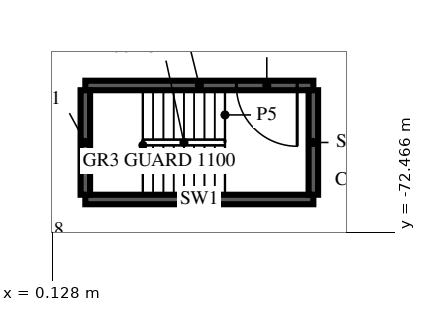
"""IFC4 building model, lengths in metres.
Left out: names, types, materials, properties, quantities, classifications, styles, units other than length and angle.
Written with IfcOpenShell. Run it as: python <this file> out.ifc"""

import sys

from ifc_helpers import new_model, si_unit, direction, frame, frame_2d, origin, place, context, subcontext, project, spatial, rectangle, extrude, element, fill, save


model = new_model("IFC4")
c1 = context("Model", 3, precision=1e-05, world=origin(), true_north=direction((0.0, 1.0)))
c2 = subcontext(c1, "Body", "Model", "MODEL_VIEW")
j1 = project(units=[si_unit("LENGTHUNIT", "METRE"), si_unit("PLANEANGLEUNIT", "RADIAN")], contexts=[c1])
p1 = place(None, origin())
s1 = spatial("IfcSite", under=j1, at=p1, CompositionType="ELEMENT")
p2 = place(p1, origin())
s2 = spatial("IfcBuilding", under=s1, at=p2, CompositionType="ELEMENT")
p3 = place(p2, origin())
s3 = spatial("IfcBuildingStorey", under=s2, at=p3, CompositionType="ELEMENT", Elevation=0.0)
p4 = place(p3, frame((1.0, -71.6, 0.0), z_axis=(0.0, 0.0, 1.0), x_axis=(1.0, 0.0, 0.0)))
e1 = element("IfcWall", 1, at=p4, inside=s3, PredefinedType="SOLIDWALL", context=c2, shape_type="SweptSolid", body=[
    extrude(rectangle(XDim=6.0, YDim=0.25, at=frame_2d((3.0, 0.0))), origin(), (0.0, 0.0, 1.0), 6.0),
])
p5 = place(p3, frame((7.0, -68.6, 0.0), z_axis=(0.0, 0.0, 1.0), x_axis=(-1.0, 0.0, 0.0)))
e2 = element("IfcWall", 2, at=p5, inside=s3, PredefinedType="SOLIDWALL", context=c2, shape_type="SweptSolid", body=[
    extrude(rectangle(XDim=6.0, YDim=0.25, at=frame_2d((3.0, 0.0))), origin(), (0.0, 0.0, 1.0), 6.0),
])
p6 = place(p5, frame((0.425, 0.0, 0.0)))
e3 = element("IfcOpeningElement", 3, at=p6, cuts=e2, PredefinedType="OPENING", context=c2, shape_type="SweptSolid", body=[
    extrude(rectangle(XDim=1.6, YDim=2.1, at=frame_2d((0.8, 1.05))), frame((0.0, 0.14, 0.0), z_axis=(0.0, -1.0, 0.0), x_axis=(1.0, 0.0, 0.0)), (0.0, 0.0, 1.0), 0.28),
])
for number, where, z_axis, x_axis in (
    (4, (7.0, -71.475, 0.0), (0.0, 0.0, 1.0), (0.0, 1.0, 0.0)),
    (5, (1.0, -68.725, 0.0), (0.0, 0.0, 1.0), (0.0, -1.0, 0.0)),
):
    element("IfcWall", number, at=place(p3, frame(where, z_axis=z_axis, x_axis=x_axis)), inside=s3, PredefinedType="SOLIDWALL", context=c2, shape_type="SweptSolid", body=[
        extrude(rectangle(XDim=2.75, YDim=0.25, at=frame_2d((1.375, 0.0))), origin(), (0.0, 0.0, 1.0), 6.0),
    ])
p7 = place(p6, origin())
e6 = element("IfcDoor", 6, at=p7, inside=s3, OperationType="DOUBLE_DOOR_SINGLE_SWING", PredefinedType="DOOR", context=c2, shape_type="SweptSolid", body=[
    extrude(rectangle(XDim=1.6, YDim=2.1, at=frame_2d((0.8, 1.05))), frame((0.0, 0.125, 0.0), z_axis=(0.0, -1.0, 0.0), x_axis=(1.0, 0.0, 0.0)), (0.0, 0.0, 1.0), 0.25),
])
fill(e3, e6)
save(model, sys.argv[1])
